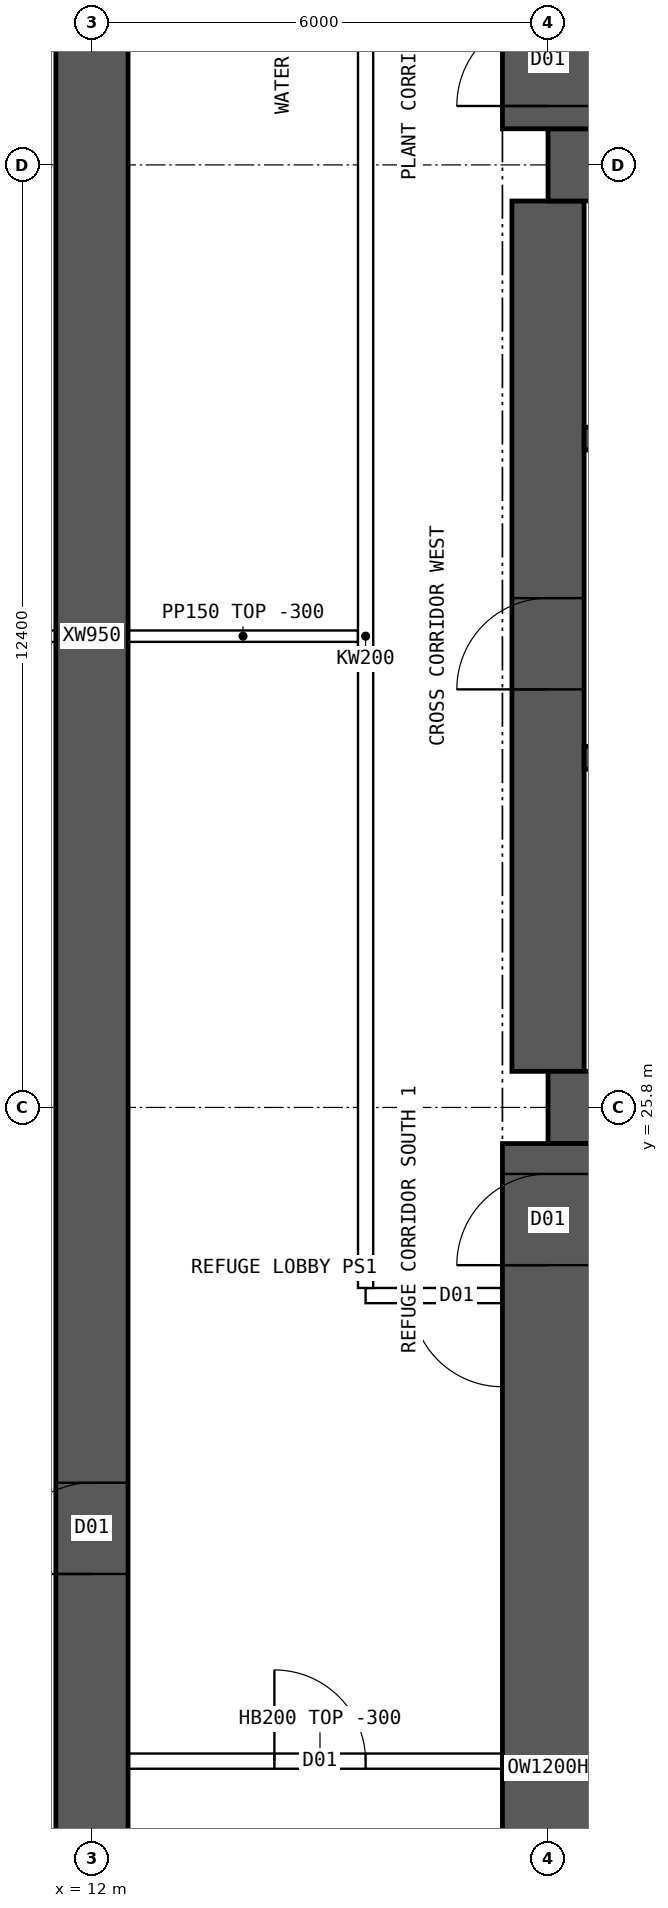
"""IFC4 building model, lengths in metres.
Left out: names, types, materials, properties, quantities, classifications, styles, units other than length and angle.
Written with IfcOpenShell. Run it as: python <this file> out.ifc"""

import sys

from ifc_helpers import new_model, si_unit, direction, frame, frame_2d, origin, place, context, subcontext, project, spatial, rectangle, extrude, element, fill, save


model = new_model("IFC4")
c1 = context("Model", 3, precision=1e-05, world=origin(), true_north=direction((0.0, 1.0)))
c2 = subcontext(c1, "Body", "Model", "MODEL_VIEW")
j1 = project(units=[si_unit("LENGTHUNIT", "METRE"), si_unit("PLANEANGLEUNIT", "RADIAN")], contexts=[c1])
p1 = place(None, origin())
s1 = spatial("IfcSite", under=j1, at=p1, CompositionType="ELEMENT")
p2 = place(p1, origin())
s2 = spatial("IfcBuilding", under=s1, at=p2, CompositionType="ELEMENT")
p3 = place(p2, frame((0.0, 0.0, 133.15)))
s3 = spatial("IfcBuildingStorey", under=s2, at=p3, CompositionType="ELEMENT", Elevation=133.15)
for number, where, z_axis, x_axis in (
    (1, (18.0, 25.8, 0.0), (0.0, 0.0, 1.0), (1.0, 0.0, 0.0)),
    (2, (18.0, 38.2, 0.0), (0.0, 0.0, 1.0), (1.0, 0.0, 0.0)),
):
    element("IfcWall", number, at=place(p3, frame(where, z_axis=z_axis, x_axis=x_axis)), inside=s3, PredefinedType="SHEAR", context=c2, shape_type="SweptSolid", body=[
        extrude(rectangle(XDim=48.0, YDim=0.95, at=frame_2d((24.0, 0.0))), origin(), (0.0, 0.0, 1.0), 7.2),
    ])
p4 = place(p3, frame((18.0, 26.275, 0.0), z_axis=(0.0, 0.0, 1.0), x_axis=(0.0, 1.0, 0.0)))
e3 = element("IfcWall", 3, at=p4, inside=s3, PredefinedType="SHEAR", context=c2, shape_type="SweptSolid", body=[
    extrude(rectangle(XDim=11.45, YDim=0.95, at=frame_2d((5.725, 0.0))), origin(), (0.0, 0.0, 1.0), 7.2),
])
p5 = place(p4, frame((5.025, 0.0, 0.0)))
e4 = element("IfcOpeningElement", 4, at=p5, cuts=e3, PredefinedType="OPENING", context=c2, shape_type="SweptSolid", body=[
    extrude(rectangle(XDim=1.2, YDim=2.1, at=frame_2d((0.6, 1.05))), frame((0.0, 0.485, 0.0), z_axis=(0.0, -1.0, 0.0), x_axis=(1.0, 0.0, 0.0)), (0.0, 0.0, 1.0), 0.97),
])
p6 = place(p3, frame((18.475, 30.4, 0.0), z_axis=(0.0, 0.0, 1.0), x_axis=(1.0, 0.0, 0.0)))
e5 = element("IfcWall", 5, at=p6, inside=s3, PredefinedType="SHEAR", context=c2, shape_type="SweptSolid", body=[
    extrude(rectangle(XDim=47.05, YDim=0.3, at=frame_2d((23.525, 0.0))), origin(), (0.0, 0.0, 1.0), 7.2),
])
p7 = place(p6, frame((0.4, 0.0, 0.0)))
e6 = element("IfcOpeningElement", 6, at=p7, cuts=e5, PredefinedType="OPENING", context=c2, shape_type="SweptSolid", body=[
    extrude(rectangle(XDim=1.0, YDim=2.1, at=frame_2d((0.5, 1.05))), frame((0.0, 0.16, 0.0), z_axis=(0.0, -1.0, 0.0), x_axis=(1.0, 0.0, 0.0)), (0.0, 0.0, 1.0), 0.32),
])
p8 = place(p6, frame((45.65, 0.0, 0.0)))
e7 = element("IfcOpeningElement", 7, at=p8, cuts=e5, PredefinedType="OPENING", context=c2, shape_type="SweptSolid", body=[
    extrude(rectangle(XDim=1.0, YDim=2.1, at=frame_2d((0.5, 1.05))), frame((0.0, 0.16, 0.0), z_axis=(0.0, -1.0, 0.0), x_axis=(1.0, 0.0, 0.0)), (0.0, 0.0, 1.0), 0.32),
])
p9 = place(p6, frame((18.85, 0.0, 0.0)))
e8 = element("IfcOpeningElement", 8, at=p9, cuts=e5, PredefinedType="OPENING", context=c2, shape_type="SweptSolid", body=[
    extrude(rectangle(XDim=0.9, YDim=2.1, at=frame_2d((0.45, 1.05))), frame((0.0, 0.16, 0.0), z_axis=(0.0, -1.0, 0.0), x_axis=(1.0, 0.0, 0.0)), (0.0, 0.0, 1.0), 0.32),
])
p10 = place(p6, frame((30.142, 0.0, 0.0)))
e9 = element("IfcOpeningElement", 9, at=p10, cuts=e5, PredefinedType="OPENING", context=c2, shape_type="SweptSolid", body=[
    extrude(rectangle(XDim=1.1, YDim=2.1, at=frame_2d((0.55, 1.05))), frame((0.0, 0.16, 0.0), z_axis=(0.0, -1.0, 0.0), x_axis=(1.0, 0.0, 0.0)), (0.0, 0.0, 1.0), 0.32),
])
p11 = place(p6, frame((33.675, 0.0, 0.0)))
e10 = element("IfcOpeningElement", 10, at=p11, cuts=e5, PredefinedType="OPENING", context=c2, shape_type="SweptSolid", body=[
    extrude(rectangle(XDim=1.1, YDim=2.1, at=frame_2d((0.55, 1.05))), frame((0.0, 0.16, 0.0), z_axis=(0.0, -1.0, 0.0), x_axis=(1.0, 0.0, 0.0)), (0.0, 0.0, 1.0), 0.32),
])
p12 = place(p6, frame((37.208, 0.0, 0.0)))
e11 = element("IfcOpeningElement", 11, at=p12, cuts=e5, PredefinedType="OPENING", context=c2, shape_type="SweptSolid", body=[
    extrude(rectangle(XDim=1.1, YDim=2.1, at=frame_2d((0.55, 1.05))), frame((0.0, 0.16, 0.0), z_axis=(0.0, -1.0, 0.0), x_axis=(1.0, 0.0, 0.0)), (0.0, 0.0, 1.0), 0.32),
])
p13 = place(p3, frame((18.475, 34.6, 0.0), z_axis=(0.0, 0.0, 1.0), x_axis=(1.0, 0.0, 0.0)))
e12 = element("IfcWall", 12, at=p13, inside=s3, PredefinedType="SHEAR", context=c2, shape_type="SweptSolid", body=[
    extrude(rectangle(XDim=47.05, YDim=0.3, at=frame_2d((23.525, 0.0))), origin(), (0.0, 0.0, 1.0), 7.2),
])
p14 = place(p13, frame((0.9, 0.0, 0.0)))
e13 = element("IfcOpeningElement", 13, at=p14, cuts=e12, PredefinedType="OPENING", context=c2, shape_type="SweptSolid", body=[
    extrude(rectangle(XDim=1.1, YDim=2.1, at=frame_2d((0.55, 1.05))), frame((0.0, 0.16, 0.0), z_axis=(0.0, -1.0, 0.0), x_axis=(1.0, 0.0, 0.0)), (0.0, 0.0, 1.0), 0.32),
])
p15 = place(p13, frame((45.05, 0.0, 0.0)))
e14 = element("IfcOpeningElement", 14, at=p15, cuts=e12, PredefinedType="OPENING", context=c2, shape_type="SweptSolid", body=[
    extrude(rectangle(XDim=1.1, YDim=2.1, at=frame_2d((0.55, 1.05))), frame((0.0, 0.16, 0.0), z_axis=(0.0, -1.0, 0.0), x_axis=(1.0, 0.0, 0.0)), (0.0, 0.0, 1.0), 0.32),
])
p16 = place(p13, frame((4.125, 0.0, 0.0)))
e15 = element("IfcOpeningElement", 15, at=p16, cuts=e12, PredefinedType="OPENING", context=c2, shape_type="SweptSolid", body=[
    extrude(rectangle(XDim=0.9, YDim=2.1, at=frame_2d((0.45, 1.05))), frame((0.0, 0.16, 0.0), z_axis=(0.0, -1.0, 0.0), x_axis=(1.0, 0.0, 0.0)), (0.0, 0.0, 1.0), 0.32),
])
p17 = place(p13, frame((42.025, 0.0, 0.0)))
e16 = element("IfcOpeningElement", 16, at=p17, cuts=e12, PredefinedType="OPENING", context=c2, shape_type="SweptSolid", body=[
    extrude(rectangle(XDim=0.9, YDim=2.1, at=frame_2d((0.45, 1.05))), frame((0.0, 0.16, 0.0), z_axis=(0.0, -1.0, 0.0), x_axis=(1.0, 0.0, 0.0)), (0.0, 0.0, 1.0), 0.32),
])
p18 = place(p13, frame((8.9, 0.0, 0.0)))
e17 = element("IfcOpeningElement", 17, at=p18, cuts=e12, PredefinedType="OPENING", context=c2, shape_type="SweptSolid", body=[
    extrude(rectangle(XDim=0.9, YDim=2.1, at=frame_2d((0.45, 1.05))), frame((0.0, 0.16, 0.0), z_axis=(0.0, -1.0, 0.0), x_axis=(1.0, 0.0, 0.0)), (0.0, 0.0, 1.0), 0.32),
])
p19 = place(p13, frame((12.874, 0.0, 0.0)))
e18 = element("IfcOpeningElement", 18, at=p19, cuts=e12, PredefinedType="OPENING", context=c2, shape_type="SweptSolid", body=[
    extrude(rectangle(XDim=0.9, YDim=2.1, at=frame_2d((0.45, 1.05))), frame((0.0, 0.16, 0.0), z_axis=(0.0, -1.0, 0.0), x_axis=(1.0, 0.0, 0.0)), (0.0, 0.0, 1.0), 0.32),
])
p20 = place(p13, frame((16.521, 0.0, 0.0)))
e19 = element("IfcOpeningElement", 19, at=p20, cuts=e12, PredefinedType="OPENING", context=c2, shape_type="SweptSolid", body=[
    extrude(rectangle(XDim=0.9, YDim=2.1, at=frame_2d((0.45, 1.05))), frame((0.0, 0.16, 0.0), z_axis=(0.0, -1.0, 0.0), x_axis=(1.0, 0.0, 0.0)), (0.0, 0.0, 1.0), 0.32),
])
p21 = place(p13, frame((20.28, 0.0, 0.0)))
e20 = element("IfcOpeningElement", 20, at=p21, cuts=e12, PredefinedType="OPENING", context=c2, shape_type="SweptSolid", body=[
    extrude(rectangle(XDim=0.9, YDim=2.1, at=frame_2d((0.45, 1.05))), frame((0.0, 0.16, 0.0), z_axis=(0.0, -1.0, 0.0), x_axis=(1.0, 0.0, 0.0)), (0.0, 0.0, 1.0), 0.32),
])
p22 = place(p13, frame((24.686, 0.0, 0.0)))
e21 = element("IfcOpeningElement", 21, at=p22, cuts=e12, PredefinedType="OPENING", context=c2, shape_type="SweptSolid", body=[
    extrude(rectangle(XDim=0.9, YDim=2.1, at=frame_2d((0.45, 1.05))), frame((0.0, 0.16, 0.0), z_axis=(0.0, -1.0, 0.0), x_axis=(1.0, 0.0, 0.0)), (0.0, 0.0, 1.0), 0.32),
])
p23 = place(p13, frame((27.483, 0.0, 0.0)))
e22 = element("IfcOpeningElement", 22, at=p23, cuts=e12, PredefinedType="OPENING", context=c2, shape_type="SweptSolid", body=[
    extrude(rectangle(XDim=0.9, YDim=2.1, at=frame_2d((0.45, 1.05))), frame((0.0, 0.16, 0.0), z_axis=(0.0, -1.0, 0.0), x_axis=(1.0, 0.0, 0.0)), (0.0, 0.0, 1.0), 0.32),
])
p24 = place(p13, frame((33.604, 0.0, 0.0)))
e23 = element("IfcOpeningElement", 23, at=p24, cuts=e12, PredefinedType="OPENING", context=c2, shape_type="SweptSolid", body=[
    extrude(rectangle(XDim=0.9, YDim=2.1, at=frame_2d((0.45, 1.05))), frame((0.0, 0.16, 0.0), z_axis=(0.0, -1.0, 0.0), x_axis=(1.0, 0.0, 0.0)), (0.0, 0.0, 1.0), 0.32),
])
p25 = place(p3, frame((12.0, 8.9, 0.0), z_axis=(0.0, 0.0, 1.0), x_axis=(0.0, 1.0, 0.0)))
e24 = element("IfcWall", 24, at=p25, inside=s3, PredefinedType="SHEAR", context=c2, shape_type="SweptSolid", body=[
    extrude(rectangle(XDim=46.2, YDim=0.95, at=frame_2d((23.1, 0.0))), origin(), (0.0, 0.0, 1.0), 7.2),
])
p26 = place(p25, frame((3.85, 0.0, 0.0)))
e25 = element("IfcOpeningElement", 25, at=p26, cuts=e24, PredefinedType="OPENING", context=c2, shape_type="SweptSolid", body=[
    extrude(rectangle(XDim=1.2, YDim=2.1, at=frame_2d((0.6, 1.05))), frame((0.0, 0.485, 0.0), z_axis=(0.0, -1.0, 0.0), x_axis=(1.0, 0.0, 0.0)), (0.0, 0.0, 1.0), 0.97),
])
p27 = place(p25, frame((10.762, 0.0, 0.0)))
e26 = element("IfcOpeningElement", 26, at=p27, cuts=e24, PredefinedType="OPENING", context=c2, shape_type="SweptSolid", body=[
    extrude(rectangle(XDim=1.2, YDim=2.1, at=frame_2d((0.6, 1.05))), frame((0.0, 0.485, 0.0), z_axis=(0.0, -1.0, 0.0), x_axis=(1.0, 0.0, 0.0)), (0.0, 0.0, 1.0), 0.97),
])
p28 = place(p25, frame((41.15, 0.0, 0.0)))
e27 = element("IfcOpeningElement", 27, at=p28, cuts=e24, PredefinedType="OPENING", context=c2, shape_type="SweptSolid", body=[
    extrude(rectangle(XDim=1.2, YDim=2.1, at=frame_2d((0.6, 1.05))), frame((0.0, 0.485, 0.0), z_axis=(0.0, -1.0, 0.0), x_axis=(1.0, 0.0, 0.0)), (0.0, 0.0, 1.0), 0.97),
])
p29 = place(p25, frame((34.238, 0.0, 0.0)))
e28 = element("IfcOpeningElement", 28, at=p29, cuts=e24, PredefinedType="OPENING", context=c2, shape_type="SweptSolid", body=[
    extrude(rectangle(XDim=1.2, YDim=2.1, at=frame_2d((0.6, 1.05))), frame((0.0, 0.485, 0.0), z_axis=(0.0, -1.0, 0.0), x_axis=(1.0, 0.0, 0.0)), (0.0, 0.0, 1.0), 0.97),
])
p30 = place(p3, frame((18.0, 8.9, 0.0), z_axis=(0.0, 0.0, 1.0), x_axis=(0.0, 1.0, 0.0)))
e29 = element("IfcWall", 29, at=p30, inside=s3, PredefinedType="SHEAR", context=c2, shape_type="SweptSolid", body=[
    extrude(rectangle(XDim=16.425, YDim=1.2, at=frame_2d((8.212, 0.0))), origin(), (0.0, 0.0, 1.0), 7.2),
])
p31 = place(p30, frame((14.825, 0.0, 0.0)))
e30 = element("IfcOpeningElement", 30, at=p31, cuts=e29, PredefinedType="OPENING", context=c2, shape_type="SweptSolid", body=[
    extrude(rectangle(XDim=1.2, YDim=2.1, at=frame_2d((0.6, 1.05))), frame((0.0, 0.61, 0.0), z_axis=(0.0, -1.0, 0.0), x_axis=(1.0, 0.0, 0.0)), (0.0, 0.0, 1.0), 1.22),
])
p32 = place(p3, frame((18.0, 38.675, 0.0), z_axis=(0.0, 0.0, 1.0), x_axis=(0.0, 1.0, 0.0)))
e31 = element("IfcWall", 31, at=p32, inside=s3, PredefinedType="SHEAR", context=c2, shape_type="SweptSolid", body=[
    extrude(rectangle(XDim=16.425, YDim=1.2, at=frame_2d((8.212, 0.0))), origin(), (0.0, 0.0, 1.0), 7.2),
])
p33 = place(p32, frame((0.3, 0.0, 0.0)))
e32 = element("IfcOpeningElement", 32, at=p33, cuts=e31, PredefinedType="OPENING", context=c2, shape_type="SweptSolid", body=[
    extrude(rectangle(XDim=1.2, YDim=2.1, at=frame_2d((0.6, 1.05))), frame((0.0, 0.61, 0.0), z_axis=(0.0, -1.0, 0.0), x_axis=(1.0, 0.0, 0.0)), (0.0, 0.0, 1.0), 1.22),
])
p34 = place(p3, frame((68.4, 23.325, 0.0), z_axis=(0.0, 0.0, 1.0), x_axis=(-1.0, 0.0, 0.0)))
e33 = element("IfcWall", 33, at=p34, inside=s3, PredefinedType="SOLIDWALL", context=c2, shape_type="SweptSolid", body=[
    extrude(rectangle(XDim=52.8, YDim=0.2, at=frame_2d((26.4, 0.0))), origin(), (0.0, 0.0, 1.0), 6.9),
])
p35 = place(p34, frame((51.0, 0.0, 0.0)))
e34 = element("IfcOpeningElement", 34, at=p35, cuts=e33, PredefinedType="OPENING", context=c2, shape_type="SweptSolid", body=[
    extrude(rectangle(XDim=1.2, YDim=2.1, at=frame_2d((0.6, 1.05))), frame((0.0, 0.11, 0.0), z_axis=(0.0, -1.0, 0.0), x_axis=(1.0, 0.0, 0.0)), (0.0, 0.0, 1.0), 0.22),
])
p36 = place(p34, frame((48.125, 0.0, 0.0)))
e35 = element("IfcOpeningElement", 35, at=p36, cuts=e33, PredefinedType="OPENING", context=c2, shape_type="SweptSolid", body=[
    extrude(rectangle(XDim=1.2, YDim=2.1, at=frame_2d((0.6, 1.05))), frame((0.0, 0.11, 0.0), z_axis=(0.0, -1.0, 0.0), x_axis=(1.0, 0.0, 0.0)), (0.0, 0.0, 1.0), 0.22),
])
p37 = place(p34, frame((42.125, 0.0, 0.0)))
e36 = element("IfcOpeningElement", 36, at=p37, cuts=e33, PredefinedType="OPENING", context=c2, shape_type="SweptSolid", body=[
    extrude(rectangle(XDim=1.2, YDim=2.1, at=frame_2d((0.6, 1.05))), frame((0.0, 0.11, 0.0), z_axis=(0.0, -1.0, 0.0), x_axis=(1.0, 0.0, 0.0)), (0.0, 0.0, 1.0), 0.22),
])
p38 = place(p34, frame((36.125, 0.0, 0.0)))
e37 = element("IfcOpeningElement", 37, at=p38, cuts=e33, PredefinedType="OPENING", context=c2, shape_type="SweptSolid", body=[
    extrude(rectangle(XDim=1.2, YDim=2.1, at=frame_2d((0.6, 1.05))), frame((0.0, 0.11, 0.0), z_axis=(0.0, -1.0, 0.0), x_axis=(1.0, 0.0, 0.0)), (0.0, 0.0, 1.0), 0.22),
])
p39 = place(p34, frame((30.125, 0.0, 0.0)))
e38 = element("IfcOpeningElement", 38, at=p39, cuts=e33, PredefinedType="OPENING", context=c2, shape_type="SweptSolid", body=[
    extrude(rectangle(XDim=1.2, YDim=2.1, at=frame_2d((0.6, 1.05))), frame((0.0, 0.11, 0.0), z_axis=(0.0, -1.0, 0.0), x_axis=(1.0, 0.0, 0.0)), (0.0, 0.0, 1.0), 0.22),
])
p40 = place(p34, frame((24.125, 0.0, 0.0)))
e39 = element("IfcOpeningElement", 39, at=p40, cuts=e33, PredefinedType="OPENING", context=c2, shape_type="SweptSolid", body=[
    extrude(rectangle(XDim=1.2, YDim=2.1, at=frame_2d((0.6, 1.05))), frame((0.0, 0.11, 0.0), z_axis=(0.0, -1.0, 0.0), x_axis=(1.0, 0.0, 0.0)), (0.0, 0.0, 1.0), 0.22),
])
p41 = place(p34, frame((18.125, 0.0, 0.0)))
e40 = element("IfcOpeningElement", 40, at=p41, cuts=e33, PredefinedType="OPENING", context=c2, shape_type="SweptSolid", body=[
    extrude(rectangle(XDim=1.2, YDim=2.1, at=frame_2d((0.6, 1.05))), frame((0.0, 0.11, 0.0), z_axis=(0.0, -1.0, 0.0), x_axis=(1.0, 0.0, 0.0)), (0.0, 0.0, 1.0), 0.22),
])
p42 = place(p34, frame((12.125, 0.0, 0.0)))
e41 = element("IfcOpeningElement", 41, at=p42, cuts=e33, PredefinedType="OPENING", context=c2, shape_type="SweptSolid", body=[
    extrude(rectangle(XDim=1.2, YDim=2.1, at=frame_2d((0.6, 1.05))), frame((0.0, 0.11, 0.0), z_axis=(0.0, -1.0, 0.0), x_axis=(1.0, 0.0, 0.0)), (0.0, 0.0, 1.0), 0.22),
])
p43 = place(p34, frame((6.125, 0.0, 0.0)))
e42 = element("IfcOpeningElement", 42, at=p43, cuts=e33, PredefinedType="OPENING", context=c2, shape_type="SweptSolid", body=[
    extrude(rectangle(XDim=1.2, YDim=2.1, at=frame_2d((0.6, 1.05))), frame((0.0, 0.11, 0.0), z_axis=(0.0, -1.0, 0.0), x_axis=(1.0, 0.0, 0.0)), (0.0, 0.0, 1.0), 0.22),
])
p44 = place(p34, frame((0.125, 0.0, 0.0)))
e43 = element("IfcOpeningElement", 43, at=p44, cuts=e33, PredefinedType="OPENING", context=c2, shape_type="SweptSolid", body=[
    extrude(rectangle(XDim=1.2, YDim=2.1, at=frame_2d((0.6, 1.05))), frame((0.0, 0.11, 0.0), z_axis=(0.0, -1.0, 0.0), x_axis=(1.0, 0.0, 0.0)), (0.0, 0.0, 1.0), 0.22),
])
p45 = place(p3, frame((15.6, 23.425, 0.0), z_axis=(0.0, 0.0, 1.0), x_axis=(0.0, 1.0, 0.0)))
e44 = element("IfcWall", 44, at=p45, inside=s3, PredefinedType="SOLIDWALL", context=c2, shape_type="SweptSolid", body=[
    extrude(rectangle(XDim=17.15, YDim=0.2, at=frame_2d((8.575, 0.0))), origin(), (0.0, 0.0, 1.0), 6.9),
])
p46 = place(p3, frame((12.475, 17.2, 0.0), z_axis=(0.0, 0.0, 1.0), x_axis=(1.0, 0.0, 0.0)))
e45 = element("IfcWall", 45, at=p46, inside=s3, PredefinedType="SOLIDWALL", context=c2, shape_type="SweptSolid", body=[
    extrude(rectangle(XDim=5.05, YDim=0.2, at=frame_2d((2.525, 0.0))), origin(), (0.0, 0.0, 1.0), 6.9),
])
p47 = place(p46, frame((1.925, 0.0, 0.0)))
e46 = element("IfcOpeningElement", 46, at=p47, cuts=e45, PredefinedType="OPENING", context=c2, shape_type="SweptSolid", body=[
    extrude(rectangle(XDim=1.2, YDim=2.1, at=frame_2d((0.6, 1.05))), frame((0.0, 0.11, 0.0), z_axis=(0.0, -1.0, 0.0), x_axis=(1.0, 0.0, 0.0)), (0.0, 0.0, 1.0), 0.22),
])
p48 = place(p3, frame((18.475, 17.2, 0.0), z_axis=(0.0, 0.0, 1.0), x_axis=(1.0, 0.0, 0.0)))
e47 = element("IfcWall", 47, at=p48, inside=s3, PredefinedType="SOLIDWALL", context=c2, shape_type="SweptSolid", body=[
    extrude(rectangle(XDim=5.05, YDim=0.2, at=frame_2d((2.525, 0.0))), origin(), (0.0, 0.0, 1.0), 6.9),
])
p49 = place(p48, frame((1.925, 0.0, 0.0)))
e48 = element("IfcOpeningElement", 48, at=p49, cuts=e47, PredefinedType="OPENING", context=c2, shape_type="SweptSolid", body=[
    extrude(rectangle(XDim=1.2, YDim=2.1, at=frame_2d((0.6, 1.05))), frame((0.0, 0.11, 0.0), z_axis=(0.0, -1.0, 0.0), x_axis=(1.0, 0.0, 0.0)), (0.0, 0.0, 1.0), 0.22),
])
p50 = place(p3, frame((3.905, 32.0, 0.0), z_axis=(0.0, 0.0, 1.0), x_axis=(1.0, 0.0, 0.0)))
e49 = element("IfcWall", 49, at=p50, inside=s3, PredefinedType="PARTITIONING", context=c2, shape_type="SweptSolid", body=[
    extrude(rectangle(XDim=7.62, YDim=0.15, at=frame_2d((3.81, 0.0))), origin(), (0.0, 0.0, 1.0), 6.9),
])
p51 = place(p3, frame((12.475, 32.0, 0.0), z_axis=(0.0, 0.0, 1.0), x_axis=(1.0, 0.0, 0.0)))
e50 = element("IfcWall", 50, at=p51, inside=s3, PredefinedType="PARTITIONING", context=c2, shape_type="SweptSolid", body=[
    extrude(rectangle(XDim=3.025, YDim=0.15, at=frame_2d((1.512, 0.0))), origin(), (0.0, 0.0, 1.0), 6.9),
])
p52 = place(p5, origin())
e51 = element("IfcDoor", 51, at=p52, inside=s3, OperationType="SINGLE_SWING_LEFT", PredefinedType="DOOR", context=c2, shape_type="SweptSolid", body=[
    extrude(rectangle(XDim=1.2, YDim=2.1, at=frame_2d((0.6, 1.05))), frame((0.0, 0.025, 0.0), z_axis=(0.0, -1.0, 0.0), x_axis=(1.0, 0.0, 0.0)), (0.0, 0.0, 1.0), 0.05),
])
fill(e4, e51)
p53 = place(p47, origin())
e52 = element("IfcDoor", 52, at=p53, inside=s3, OperationType="SINGLE_SWING_LEFT", PredefinedType="DOOR", context=c2, shape_type="SweptSolid", body=[
    extrude(rectangle(XDim=1.2, YDim=2.1, at=frame_2d((0.6, 1.05))), frame((0.0, 0.025, 0.0), z_axis=(0.0, -1.0, 0.0), x_axis=(1.0, 0.0, 0.0)), (0.0, 0.0, 1.0), 0.05),
])
fill(e46, e52)
p54 = place(p35, origin())
e53 = element("IfcDoor", 53, at=p54, inside=s3, OperationType="SINGLE_SWING_LEFT", PredefinedType="DOOR", context=c2, shape_type="SweptSolid", body=[
    extrude(rectangle(XDim=1.2, YDim=2.1, at=frame_2d((0.6, 1.05))), frame((0.0, 0.025, 0.0), z_axis=(0.0, -1.0, 0.0), x_axis=(1.0, 0.0, 0.0)), (0.0, 0.0, 1.0), 0.05),
])
fill(e34, e53)
p55 = place(p31, origin())
e54 = element("IfcDoor", 54, at=p55, inside=s3, OperationType="SINGLE_SWING_LEFT", PredefinedType="DOOR", context=c2, shape_type="SweptSolid", body=[
    extrude(rectangle(XDim=1.2, YDim=2.1, at=frame_2d((0.6, 1.05))), frame((0.0, 0.025, 0.0), z_axis=(0.0, -1.0, 0.0), x_axis=(1.0, 0.0, 0.0)), (0.0, 0.0, 1.0), 0.05),
])
fill(e30, e54)
p56 = place(p33, origin())
e55 = element("IfcDoor", 55, at=p56, inside=s3, OperationType="SINGLE_SWING_LEFT", PredefinedType="DOOR", context=c2, shape_type="SweptSolid", body=[
    extrude(rectangle(XDim=1.2, YDim=2.1, at=frame_2d((0.6, 1.05))), frame((0.0, 0.025, 0.0), z_axis=(0.0, -1.0, 0.0), x_axis=(1.0, 0.0, 0.0)), (0.0, 0.0, 1.0), 0.05),
])
fill(e32, e55)
p57 = place(p27, origin())
e56 = element("IfcDoor", 56, at=p57, inside=s3, OperationType="SINGLE_SWING_LEFT", PredefinedType="DOOR", context=c2, shape_type="SweptSolid", body=[
    extrude(rectangle(XDim=1.2, YDim=2.1, at=frame_2d((0.6, 1.05))), frame((0.0, 0.46, 0.0), z_axis=(0.0, -1.0, 0.0), x_axis=(1.0, 0.0, 0.0)), (0.0, 0.0, 1.0), 0.05),
])
fill(e26, e56)
save(model, sys.argv[1])
